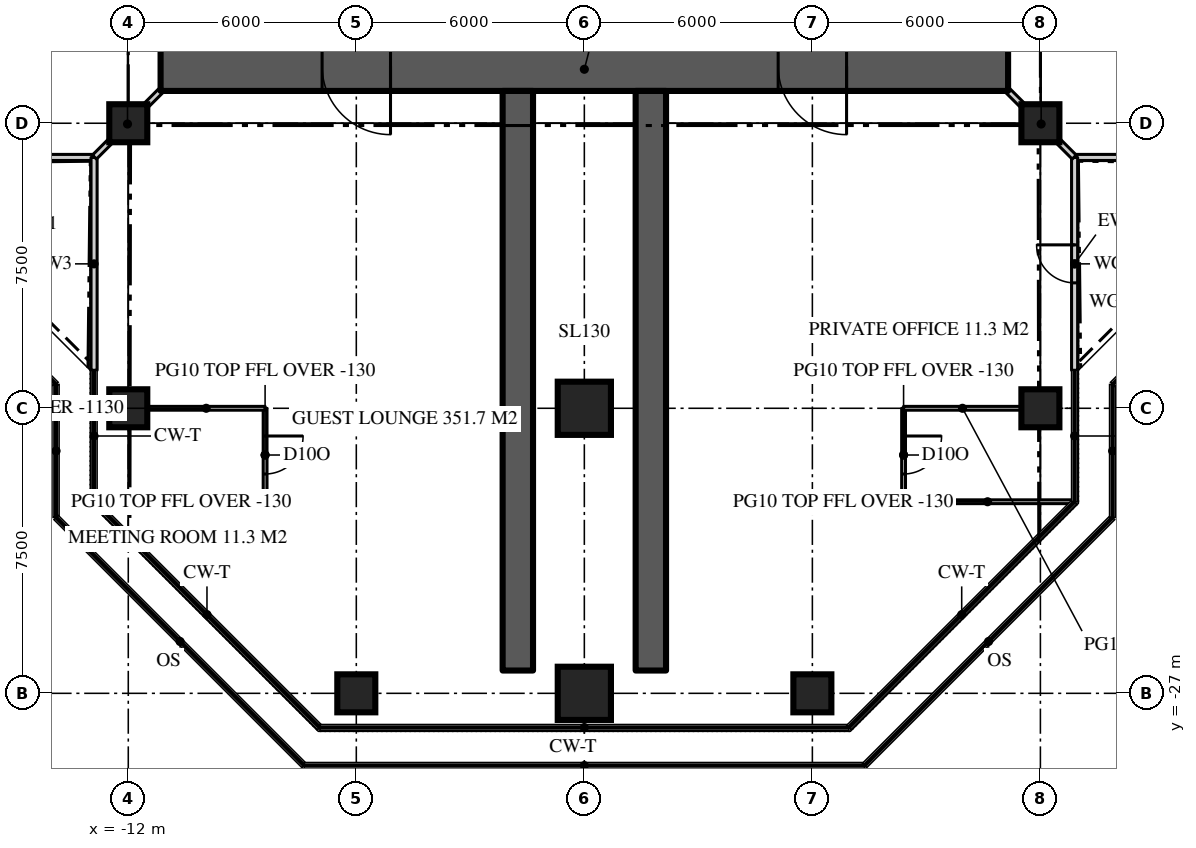
"""IFC4 building model, lengths in metres.
Left out: names, types, materials, properties, quantities, classifications, styles, units other than length and angle.
Written with IfcOpenShell. Run it as: python <this file> out.ifc"""

import sys

from ifc_helpers import new_model, si_unit, direction, frame, frame_2d, origin, origin_2d, place, context, subcontext, project, spatial, rectangle, extrude, element, fill, save


model = new_model("IFC4")
c1 = context("Model", 3, precision=1e-05, world=origin(), true_north=direction((0.0, 1.0)))
c2 = subcontext(c1, "Body", "Model", "MODEL_VIEW")
j1 = project(units=[si_unit("LENGTHUNIT", "METRE"), si_unit("PLANEANGLEUNIT", "RADIAN")], contexts=[c1])
p1 = place(None, origin())
s1 = spatial("IfcSite", under=j1, at=p1, CompositionType="ELEMENT")
p2 = place(p1, origin())
s2 = spatial("IfcBuilding", under=s1, at=p2, CompositionType="ELEMENT")
p3 = place(p2, frame((0.0, 0.0, 298.5)))
s3 = spatial("IfcBuildingStorey", under=s2, at=p3, CompositionType="ELEMENT", Elevation=298.5)
p4 = place(p3, frame((11.15, -10.5, 0.0), z_axis=(0.0, 0.0, 1.0), x_axis=(-1.0, 0.0, 0.0)))
e1 = element("IfcWall", 1, at=p4, inside=s3, PredefinedType="SHEAR", context=c2, shape_type="SweptSolid", body=[
    extrude(rectangle(XDim=22.3, YDim=1.3, at=frame_2d((11.15, 0.0))), origin(), (0.0, 0.0, 1.0), 3.9),
])
p5 = place(p4, frame((16.25, 0.0, 0.0)))
e2 = element("IfcOpeningElement", 2, at=p5, cuts=e1, PredefinedType="OPENING", context=c2, shape_type="SweptSolid", body=[
    extrude(rectangle(XDim=1.8, YDim=2.2, at=frame_2d((0.9, 1.1))), frame((0.0, 0.66, 0.0), z_axis=(0.0, -1.0, 0.0), x_axis=(1.0, 0.0, 0.0)), (0.0, 0.0, 1.0), 1.32),
])
p6 = place(p4, frame((4.25, 0.0, 0.0)))
e3 = element("IfcOpeningElement", 3, at=p6, cuts=e1, PredefinedType="OPENING", context=c2, shape_type="SweptSolid", body=[
    extrude(rectangle(XDim=1.8, YDim=2.2, at=frame_2d((0.9, 1.1))), frame((0.0, 0.66, 0.0), z_axis=(0.0, -1.0, 0.0), x_axis=(1.0, 0.0, 0.0)), (0.0, 0.0, 1.0), 1.32),
])
for number, where, z_axis, x_axis in (
    (4, (-1.75, -11.15, 0.0), (0.0, 0.0, 1.0), (0.0, -1.0, 0.0)),
    (5, (1.75, -11.15, 0.0), (0.0, 0.0, 1.0), (0.0, -1.0, 0.0)),
):
    element("IfcWall", number, at=place(p3, frame(where, z_axis=z_axis, x_axis=x_axis)), inside=s3, PredefinedType="SHEAR", context=c2, shape_type="SweptSolid", body=[
        extrude(rectangle(XDim=15.25, YDim=0.8, at=frame_2d((7.625, 0.0))), origin(), (0.0, 0.0, 1.0), 3.9),
    ])
p7 = place(p3, frame((-6.0, -27.0, 0.0), z_axis=(0.0, 0.0, 1.0), x_axis=(1.0, 0.0, 0.0)))
e6 = element("IfcColumn", 6, at=p7, inside=s3, PredefinedType="COLUMN", context=c2, shape_type="SweptSolid", body=[
    extrude(rectangle(XDim=1.0, YDim=1.0, at=origin_2d()), origin(), (0.0, 0.0, 1.0), 3.9),
])
p8 = place(p3, frame((0.0, -27.0, 0.0), z_axis=(0.0, 0.0, 1.0), x_axis=(1.0, 0.0, 0.0)))
e7 = element("IfcColumn", 7, at=p8, inside=s3, PredefinedType="COLUMN", context=c2, shape_type="SweptSolid", body=[
    extrude(rectangle(XDim=1.4, YDim=1.4, at=origin_2d()), origin(), (0.0, 0.0, 1.0), 3.9),
])
for number, where, z_axis, x_axis in (
    (8, (6.0, -27.0, 0.0), (0.0, 0.0, 1.0), (1.0, 0.0, 0.0)),
    (9, (-12.0, -19.5, 0.0), (0.0, 0.0, 1.0), (1.0, 0.0, 0.0)),
):
    element("IfcColumn", number, at=place(p3, frame(where, z_axis=z_axis, x_axis=x_axis)), inside=s3, PredefinedType="COLUMN", context=c2, shape_type="SweptSolid", body=[
        extrude(rectangle(XDim=1.0, YDim=1.0, at=origin_2d()), origin(), (0.0, 0.0, 1.0), 3.9),
    ])
p9 = place(p3, frame((0.0, -19.5, 0.0), z_axis=(0.0, 0.0, 1.0), x_axis=(1.0, 0.0, 0.0)))
e10 = element("IfcColumn", 10, at=p9, inside=s3, PredefinedType="COLUMN", context=c2, shape_type="SweptSolid", body=[
    extrude(rectangle(XDim=1.4, YDim=1.4, at=origin_2d()), origin(), (0.0, 0.0, 1.0), 3.9),
])
for number, where, z_axis, x_axis in (
    (11, (12.0, -19.5, 0.0), (0.0, 0.0, 1.0), (1.0, 0.0, 0.0)),
    (12, (-12.0, -12.0, 0.0), (0.0, 0.0, 1.0), (1.0, 0.0, 0.0)),
    (13, (12.0, -12.0, 0.0), (0.0, 0.0, 1.0), (1.0, 0.0, 0.0)),
):
    element("IfcColumn", number, at=place(p3, frame(where, z_axis=z_axis, x_axis=x_axis)), inside=s3, PredefinedType="COLUMN", context=c2, shape_type="SweptSolid", body=[
        extrude(rectangle(XDim=1.0, YDim=1.0, at=origin_2d()), origin(), (0.0, 0.0, 1.0), 3.9),
    ])
p10 = place(p3, frame((12.9, -12.9, 0.0), z_axis=(0.0, 0.0, 1.0), x_axis=(1.0, 0.0, 0.0)))
e14 = element("IfcWall", 14, at=p10, inside=s3, PredefinedType="SOLIDWALL", context=c2, shape_type="SweptSolid", body=[
    extrude(rectangle(XDim=5.6, YDim=0.16, at=frame_2d((2.8, 0.0))), origin(), (0.0, 0.0, 1.0), 3.77),
])
p11 = place(p3, frame((-18.5, -12.9, 0.0), z_axis=(0.0, 0.0, 1.0), x_axis=(1.0, 0.0, 0.0)))
e15 = element("IfcWall", 15, at=p11, inside=s3, PredefinedType="SOLIDWALL", context=c2, shape_type="SweptSolid", body=[
    extrude(rectangle(XDim=5.6, YDim=0.16, at=frame_2d((2.8, 0.0))), origin(), (0.0, 0.0, 1.0), 3.77),
])
p12 = place(p11, frame((2.3, 0.0, 0.0)))
e16 = element("IfcOpeningElement", 16, at=p12, cuts=e15, PredefinedType="OPENING", context=c2, shape_type="SweptSolid", body=[
    extrude(rectangle(XDim=1.0, YDim=2.2, at=frame_2d((0.5, 1.1))), frame((0.0, 0.09, 0.0), z_axis=(0.0, -1.0, 0.0), x_axis=(1.0, 0.0, 0.0)), (0.0, 0.0, 1.0), 0.18),
])
p13 = place(p3, frame((-12.9, -12.9, 0.0), z_axis=(0.0, 0.0, 1.0), x_axis=(0.0, -1.0, 0.0)))
e17 = element("IfcWall", 17, at=p13, inside=s3, PredefinedType="SOLIDWALL", context=c2, shape_type="SweptSolid", body=[
    extrude(rectangle(XDim=5.6, YDim=0.16, at=frame_2d((2.8, 0.0))), origin(), (0.0, 0.0, 1.0), 3.77),
])
p14 = place(p3, frame((12.9, -18.5, 0.0), z_axis=(0.0, 0.0, 1.0), x_axis=(0.0, 1.0, 0.0)))
e18 = element("IfcWall", 18, at=p14, inside=s3, PredefinedType="SOLIDWALL", context=c2, shape_type="SweptSolid", body=[
    extrude(rectangle(XDim=5.6, YDim=0.16, at=frame_2d((2.8, 0.0))), origin(), (0.0, 0.0, 1.0), 3.77),
])
p15 = place(p14, frame((2.3, 0.0, 0.0)))
e19 = element("IfcOpeningElement", 19, at=p15, cuts=e18, PredefinedType="OPENING", context=c2, shape_type="SweptSolid", body=[
    extrude(rectangle(XDim=1.0, YDim=2.2, at=frame_2d((0.5, 1.1))), frame((0.0, 0.09, 0.0), z_axis=(0.0, -1.0, 0.0), x_axis=(1.0, 0.0, 0.0)), (0.0, 0.0, 1.0), 0.18),
])
p16 = place(p3, frame((8.4, -19.5, 0.0), z_axis=(0.0, 0.0, 1.0), x_axis=(0.0, -1.0, 0.0)))
e20 = element("IfcWall", 20, at=p16, inside=s3, PredefinedType="PARTITIONING", context=c2, shape_type="SweptSolid", body=[
    extrude(rectangle(XDim=2.459, YDim=0.1, at=frame_2d((1.229, 0.0))), origin(), (0.0, 0.0, 1.0), 3.77),
])
p17 = place(p16, frame((0.729, 0.0, 0.0)))
e21 = element("IfcOpeningElement", 21, at=p17, cuts=e20, PredefinedType="OPENING", context=c2, shape_type="SweptSolid", body=[
    extrude(rectangle(XDim=1.0, YDim=2.2, at=frame_2d((0.5, 1.1))), frame((0.0, 0.06, 0.0), z_axis=(0.0, -1.0, 0.0), x_axis=(1.0, 0.0, 0.0)), (0.0, 0.0, 1.0), 0.12),
])
p18 = place(p3, frame((8.4, -19.5, 0.0), z_axis=(0.0, 0.0, 1.0), x_axis=(1.0, 0.0, 0.0)))
e22 = element("IfcWall", 22, at=p18, inside=s3, PredefinedType="PARTITIONING", context=c2, shape_type="SweptSolid", body=[
    extrude(rectangle(XDim=3.1, YDim=0.1, at=frame_2d((1.55, 0.0))), origin(), (0.0, 0.0, 1.0), 2.77),
])
p19 = place(p3, frame((8.4, -21.959, 0.0), z_axis=(0.0, 0.0, 1.0), x_axis=(1.0, 0.0, 0.0)))
e23 = element("IfcWall", 23, at=p19, inside=s3, PredefinedType="PARTITIONING", context=c2, shape_type="SweptSolid", body=[
    extrude(rectangle(XDim=4.42, YDim=0.1, at=frame_2d((2.21, 0.0))), origin(), (0.0, 0.0, 1.0), 3.77),
])
p20 = place(p3, frame((-8.4, -19.5, 0.0), z_axis=(0.0, 0.0, 1.0), x_axis=(0.0, -1.0, 0.0)))
e24 = element("IfcWall", 24, at=p20, inside=s3, PredefinedType="PARTITIONING", context=c2, shape_type="SweptSolid", body=[
    extrude(rectangle(XDim=2.459, YDim=0.1, at=frame_2d((1.229, 0.0))), origin(), (0.0, 0.0, 1.0), 3.77),
])
p21 = place(p20, frame((0.729, 0.0, 0.0)))
e25 = element("IfcOpeningElement", 25, at=p21, cuts=e24, PredefinedType="OPENING", context=c2, shape_type="SweptSolid", body=[
    extrude(rectangle(XDim=1.0, YDim=2.2, at=frame_2d((0.5, 1.1))), frame((0.0, 0.06, 0.0), z_axis=(0.0, -1.0, 0.0), x_axis=(1.0, 0.0, 0.0)), (0.0, 0.0, 1.0), 0.12),
])
p22 = place(p3, frame((-8.4, -19.5, 0.0), z_axis=(0.0, 0.0, 1.0), x_axis=(-1.0, 0.0, 0.0)))
e26 = element("IfcWall", 26, at=p22, inside=s3, PredefinedType="PARTITIONING", context=c2, shape_type="SweptSolid", body=[
    extrude(rectangle(XDim=3.1, YDim=0.1, at=frame_2d((1.55, 0.0))), origin(), (0.0, 0.0, 1.0), 2.77),
])
p23 = place(p3, frame((-8.4, -21.959, 0.0), z_axis=(0.0, 0.0, 1.0), x_axis=(-1.0, 0.0, 0.0)))
e27 = element("IfcWall", 27, at=p23, inside=s3, PredefinedType="PARTITIONING", context=c2, shape_type="SweptSolid", body=[
    extrude(rectangle(XDim=4.42, YDim=0.1, at=frame_2d((2.21, 0.0))), origin(), (0.0, 0.0, 1.0), 3.77),
])
for number, where, z_axis, x_axis in (
    (28, (-11.15, -11.15, 0.0), (0.0, 0.0, 1.0), (-0.707, -0.707, 0.0)),
    (29, (11.15, -11.15, 0.0), (0.0, 0.0, 1.0), (0.707, -0.707, 0.0)),
):
    element("IfcWall", number, at=place(p3, frame(where, z_axis=z_axis, x_axis=x_axis)), inside=s3, PredefinedType="PARTITIONING", context=c2, shape_type="SweptSolid", body=[
        extrude(rectangle(XDim=2.461, YDim=0.15, at=frame_2d((1.23, 0.0))), origin(), (0.0, 0.0, 1.0), 3.22),
    ])
p24 = place(p15, origin())
e30 = element("IfcDoor", 30, at=p24, inside=s3, OperationType="SINGLE_SWING_RIGHT", PredefinedType="DOOR", context=c2, shape_type="SweptSolid", body=[
    extrude(rectangle(XDim=1.0, YDim=2.2, at=frame_2d((0.5, 1.1))), frame((0.0, 0.025, 0.0), z_axis=(0.0, -1.0, 0.0), x_axis=(1.0, 0.0, 0.0)), (0.0, 0.0, 1.0), 0.05),
])
fill(e19, e30)
p25 = place(p5, origin())
e31 = element("IfcDoor", 31, at=p25, inside=s3, OperationType="DOUBLE_DOOR_DOUBLE_SWING", PredefinedType="DOOR", context=c2, shape_type="SweptSolid", body=[
    extrude(rectangle(XDim=1.8, YDim=2.2, at=frame_2d((0.9, 1.1))), frame((0.0, 0.025, 0.0), z_axis=(0.0, -1.0, 0.0), x_axis=(1.0, 0.0, 0.0)), (0.0, 0.0, 1.0), 0.05),
])
fill(e2, e31)
p26 = place(p6, origin())
e32 = element("IfcDoor", 32, at=p26, inside=s3, OperationType="DOUBLE_DOOR_DOUBLE_SWING", PredefinedType="DOOR", context=c2, shape_type="SweptSolid", body=[
    extrude(rectangle(XDim=1.8, YDim=2.2, at=frame_2d((0.9, 1.1))), frame((0.0, 0.025, 0.0), z_axis=(0.0, -1.0, 0.0), x_axis=(1.0, 0.0, 0.0)), (0.0, 0.0, 1.0), 0.05),
])
fill(e3, e32)
p27 = place(p17, origin())
e33 = element("IfcDoor", 33, at=p27, inside=s3, OperationType="SINGLE_SWING_LEFT", PredefinedType="DOOR", context=c2, shape_type="SweptSolid", body=[
    extrude(rectangle(XDim=1.0, YDim=2.2, at=frame_2d((0.5, 1.1))), frame((0.0, 0.025, 0.0), z_axis=(0.0, -1.0, 0.0), x_axis=(1.0, 0.0, 0.0)), (0.0, 0.0, 1.0), 0.05),
])
fill(e21, e33)
p28 = place(p21, origin())
e34 = element("IfcDoor", 34, at=p28, inside=s3, OperationType="SINGLE_SWING_LEFT", PredefinedType="DOOR", context=c2, shape_type="SweptSolid", body=[
    extrude(rectangle(XDim=1.0, YDim=2.2, at=frame_2d((0.5, 1.1))), frame((0.0, 0.025, 0.0), z_axis=(0.0, -1.0, 0.0), x_axis=(1.0, 0.0, 0.0)), (0.0, 0.0, 1.0), 0.05),
])
fill(e25, e34)
save(model, sys.argv[1])
